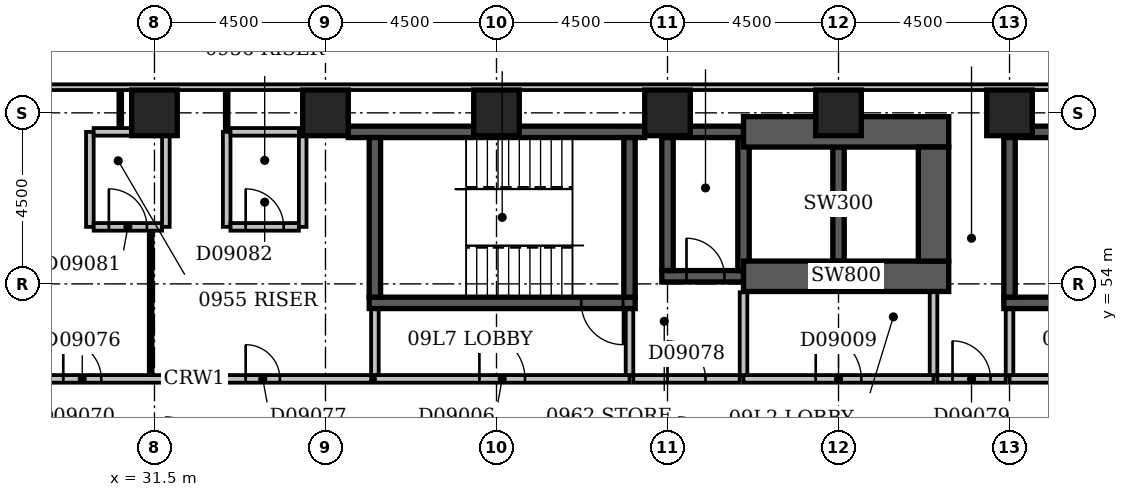
"""IFC4 building model, lengths in metres.
Left out: names, types, materials, properties, quantities, classifications, styles, units other than length and angle.
Written with IfcOpenShell. Run it as: python <this file> out.ifc"""

import sys

from ifc_helpers import new_model, si_unit, direction, frame, frame_2d, origin, origin_2d, place, context, subcontext, project, spatial, rectangle, extrude, element, fill, save


model = new_model("IFC4")
c1 = context("Model", 3, precision=1e-05, world=origin(), true_north=direction((0.0, 1.0)))
c2 = subcontext(c1, "Body", "Model", "MODEL_VIEW")
j1 = project(units=[si_unit("LENGTHUNIT", "METRE"), si_unit("PLANEANGLEUNIT", "RADIAN")], contexts=[c1])
p1 = place(None, origin())
s1 = spatial("IfcSite", under=j1, at=p1, CompositionType="ELEMENT")
p2 = place(p1, origin())
s2 = spatial("IfcBuilding", under=s1, at=p2, CompositionType="ELEMENT")
p3 = place(p2, frame((0.0, 0.0, 43.4)))
s3 = spatial("IfcBuildingStorey", under=s2, at=p3, CompositionType="ELEMENT", Elevation=43.4)
p4 = place(p3, frame((36.6, 58.0, -0.3), z_axis=(0.0, 0.0, 1.0), x_axis=(1.0, 0.0, 0.0)))
e1 = element("IfcWall", 1, at=p4, inside=s3, PredefinedType="SHEAR", context=c2, shape_type="SweptSolid", body=[
    extrude(rectangle(XDim=7.8, YDim=0.3, at=frame_2d((3.9, 0.0))), origin(), (0.0, 0.0, 1.0), 3.6),
])
p5 = place(p3, frame((37.15, 53.5, -0.3), z_axis=(0.0, 0.0, 1.0), x_axis=(1.0, 0.0, 0.0)))
e2 = element("IfcWall", 2, at=p5, inside=s3, PredefinedType="SHEAR", context=c2, shape_type="SweptSolid", body=[
    extrude(rectangle(XDim=7.0, YDim=0.3, at=frame_2d((3.5, 0.0))), origin(), (0.0, 0.0, 1.0), 3.6),
])
p6 = place(p5, frame((5.58, 0.0, 0.3)))
e3 = element("IfcOpeningElement", 3, at=p6, cuts=e2, PredefinedType="OPENING", context=c2, shape_type="SweptSolid", body=[
    extrude(rectangle(XDim=1.1, YDim=2.1, at=frame_2d((0.55, 1.05))), frame((0.0, 0.162, 0.0), z_axis=(0.0, -1.0, 0.0), x_axis=(1.0, 0.0, 0.0)), (0.0, 0.0, 1.0), 0.324),
])
for number, where, z_axis, x_axis in (
    (4, (37.3, 53.65, -0.3), (0.0, 0.0, 1.0), (0.0, 1.0, 0.0)),
    (5, (44.0, 53.65, -0.3), (0.0, 0.0, 1.0), (0.0, 1.0, 0.0)),
):
    element("IfcWall", number, at=place(p3, frame(where, z_axis=z_axis, x_axis=x_axis)), inside=s3, PredefinedType="SHEAR", context=c2, shape_type="SweptSolid", body=[
        extrude(rectangle(XDim=4.2, YDim=0.3, at=frame_2d((2.1, 0.0))), origin(), (0.0, 0.0, 1.0), 3.6),
    ])
p7 = place(p3, frame((44.85, 54.2, -0.3), z_axis=(0.0, 0.0, 1.0), x_axis=(1.0, 0.0, 0.0)))
e6 = element("IfcWall", 6, at=p7, inside=s3, PredefinedType="SHEAR", context=c2, shape_type="SweptSolid", body=[
    extrude(rectangle(XDim=2.15, YDim=0.3, at=frame_2d((1.075, 0.0))), origin(), (0.0, 0.0, 1.0), 3.6),
])
p8 = place(p7, frame((0.65, 0.0, 0.3)))
e7 = element("IfcOpeningElement", 7, at=p8, cuts=e6, PredefinedType="OPENING", context=c2, shape_type="SweptSolid", body=[
    extrude(rectangle(XDim=1.0, YDim=2.1, at=frame_2d((0.5, 1.05))), frame((0.0, 0.162, 0.0), z_axis=(0.0, -1.0, 0.0), x_axis=(1.0, 0.0, 0.0)), (0.0, 0.0, 1.0), 0.324),
])
p9 = place(p3, frame((44.85, 58.0, -0.3), z_axis=(0.0, 0.0, 1.0), x_axis=(1.0, 0.0, 0.0)))
e8 = element("IfcWall", 8, at=p9, inside=s3, PredefinedType="SHEAR", context=c2, shape_type="SweptSolid", body=[
    extrude(rectangle(XDim=2.15, YDim=0.3, at=frame_2d((1.075, 0.0))), origin(), (0.0, 0.0, 1.0), 3.6),
])
p10 = place(p3, frame((45.0, 54.35, -0.3), z_axis=(0.0, 0.0, 1.0), x_axis=(0.0, 1.0, 0.0)))
e9 = element("IfcWall", 9, at=p10, inside=s3, PredefinedType="SHEAR", context=c2, shape_type="SweptSolid", body=[
    extrude(rectangle(XDim=3.5, YDim=0.3, at=frame_2d((1.75, 0.0))), origin(), (0.0, 0.0, 1.0), 3.6),
])
p11 = place(p3, frame((47.0, 54.2, -0.3), z_axis=(0.0, 0.0, 1.0), x_axis=(1.0, 0.0, 0.0)))
e10 = element("IfcWall", 10, at=p11, inside=s3, PredefinedType="SHEAR", context=c2, shape_type="SweptSolid", body=[
    extrude(rectangle(XDim=5.4, YDim=0.8, at=frame_2d((2.7, 0.0))), origin(), (0.0, 0.0, 1.0), 3.6),
])
p12 = place(p3, frame((47.0, 54.35, -0.3), z_axis=(0.0, 0.0, 1.0), x_axis=(0.0, 1.0, 0.0)))
e11 = element("IfcWall", 11, at=p12, inside=s3, PredefinedType="SHEAR", context=c2, shape_type="SweptSolid", body=[
    extrude(rectangle(XDim=3.5, YDim=0.3, at=frame_2d((1.75, 0.0))), origin(), (0.0, 0.0, 1.0), 3.6),
])
p13 = place(p3, frame((47.0, 58.0, -0.3), z_axis=(0.0, 0.0, 1.0), x_axis=(1.0, 0.0, 0.0)))
e12 = element("IfcWall", 12, at=p13, inside=s3, PredefinedType="SHEAR", context=c2, shape_type="SweptSolid", body=[
    extrude(rectangle(XDim=5.4, YDim=0.8, at=frame_2d((2.7, 0.0))), origin(), (0.0, 0.0, 1.0), 3.6),
])
p14 = place(p3, frame((49.5, 54.6, -0.3), z_axis=(0.0, 0.0, 1.0), x_axis=(0.0, 1.0, 0.0)))
e13 = element("IfcWall", 13, at=p14, inside=s3, PredefinedType="SHEAR", context=c2, shape_type="SweptSolid", body=[
    extrude(rectangle(XDim=3.0, YDim=0.3, at=frame_2d((1.5, 0.0))), origin(), (0.0, 0.0, 1.0), 3.6),
])
p15 = place(p3, frame((52.0, 54.6, -0.3), z_axis=(0.0, 0.0, 1.0), x_axis=(0.0, 1.0, 0.0)))
e14 = element("IfcWall", 14, at=p15, inside=s3, PredefinedType="SHEAR", context=c2, shape_type="SweptSolid", body=[
    extrude(rectangle(XDim=3.0, YDim=0.8, at=frame_2d((1.5, 0.0))), origin(), (0.0, 0.0, 1.0), 3.6),
])
p16 = place(p3, frame((53.85, 53.5, -0.3), z_axis=(0.0, 0.0, 1.0), x_axis=(1.0, 0.0, 0.0)))
e15 = element("IfcWall", 15, at=p16, inside=s3, PredefinedType="SHEAR", context=c2, shape_type="SweptSolid", body=[
    extrude(rectangle(XDim=7.0, YDim=0.3, at=frame_2d((3.5, 0.0))), origin(), (0.0, 0.0, 1.0), 3.6),
])
p17 = place(p16, frame((5.58, 0.0, 0.3)))
e16 = element("IfcOpeningElement", 16, at=p17, cuts=e15, PredefinedType="OPENING", context=c2, shape_type="SweptSolid", body=[
    extrude(rectangle(XDim=1.1, YDim=2.1, at=frame_2d((0.55, 1.05))), frame((0.0, 0.162, 0.0), z_axis=(0.0, -1.0, 0.0), x_axis=(1.0, 0.0, 0.0)), (0.0, 0.0, 1.0), 0.324),
])
p18 = place(p3, frame((53.85, 58.0, -0.3), z_axis=(0.0, 0.0, 1.0), x_axis=(1.0, 0.0, 0.0)))
e17 = element("IfcWall", 17, at=p18, inside=s3, PredefinedType="SHEAR", context=c2, shape_type="SweptSolid", body=[
    extrude(rectangle(XDim=7.0, YDim=0.3, at=frame_2d((3.5, 0.0))), origin(), (0.0, 0.0, 1.0), 3.6),
])
p19 = place(p3, frame((54.0, 53.65, -0.3), z_axis=(0.0, 0.0, 1.0), x_axis=(0.0, 1.0, 0.0)))
e18 = element("IfcWall", 18, at=p19, inside=s3, PredefinedType="SHEAR", context=c2, shape_type="SweptSolid", body=[
    extrude(rectangle(XDim=4.2, YDim=0.3, at=frame_2d((2.1, 0.0))), origin(), (0.0, 0.0, 1.0), 3.6),
])
for number, where, z_axis, x_axis in (
    (19, (31.5, 58.5, -0.3), (0.0, 0.0, 1.0), (1.0, 0.0, 0.0)),
    (20, (36.0, 58.5, -0.3), (0.0, 0.0, 1.0), (1.0, 0.0, 0.0)),
    (21, (40.5, 58.5, -0.3), (0.0, 0.0, 1.0), (1.0, 0.0, 0.0)),
    (22, (45.0, 58.5, -0.3), (0.0, 0.0, 1.0), (1.0, 0.0, 0.0)),
    (23, (49.5, 58.5, -0.3), (0.0, 0.0, 1.0), (1.0, 0.0, 0.0)),
    (24, (54.0, 58.5, -0.3), (0.0, 0.0, 1.0), (1.0, 0.0, 0.0)),
):
    element("IfcColumn", number, at=place(p3, frame(where, z_axis=z_axis, x_axis=x_axis)), inside=s3, PredefinedType="COLUMN", context=c2, shape_type="SweptSolid", body=[
        extrude(rectangle(XDim=1.2, YDim=1.2, at=origin_2d()), origin(), (0.0, 0.0, 1.0), 3.6),
    ])
p20 = place(p3, frame((68.1, 59.175, 0.0), z_axis=(0.0, 0.0, 1.0), x_axis=(-1.0, 0.0, 0.0)))
e25 = element("IfcWall", 25, at=p20, inside=s3, PredefinedType="STANDARD", context=c2, shape_type="SweptSolid", body=[
    extrude(rectangle(XDim=68.85, YDim=0.15, at=frame_2d((34.425, 0.0))), origin(), (0.0, 0.0, 1.0), 2.7),
])
p21 = place(p20, frame((1.523, 0.0, 0.6)))
e26 = element("IfcOpeningElement", 26, at=p21, cuts=e25, PredefinedType="OPENING", context=c2, shape_type="SweptSolid", body=[
    extrude(rectangle(XDim=1.2, YDim=1.8, at=frame_2d((0.6, 0.9))), frame((0.0, 0.087, 0.0), z_axis=(0.0, -1.0, 0.0), x_axis=(1.0, 0.0, 0.0)), (0.0, 0.0, 1.0), 0.174),
])
p22 = place(p20, frame((6.15, 0.0, 0.6)))
e27 = element("IfcOpeningElement", 27, at=p22, cuts=e25, PredefinedType="OPENING", context=c2, shape_type="SweptSolid", body=[
    extrude(rectangle(XDim=2.4, YDim=1.8, at=frame_2d((1.2, 0.9))), frame((0.0, 0.087, 0.0), z_axis=(0.0, -1.0, 0.0), x_axis=(1.0, 0.0, 0.0)), (0.0, 0.0, 1.0), 0.174),
])
p23 = place(p3, frame((47.0, 51.5, 0.0), z_axis=(0.0, 0.0, 1.0), x_axis=(1.0, 0.0, 0.0)))
e28 = element("IfcWall", 28, at=p23, inside=s3, PredefinedType="PARTITIONING", context=c2, shape_type="SweptSolid", body=[
    extrude(rectangle(XDim=5.0, YDim=0.2, at=frame_2d((2.5, 0.0))), origin(), (0.0, 0.0, 1.0), 3.3),
])
p24 = place(p23, frame((1.9, 0.0, 0.0)))
e29 = element("IfcOpeningElement", 29, at=p24, cuts=e28, PredefinedType="OPENING", context=c2, shape_type="SweptSolid", body=[
    extrude(rectangle(XDim=1.2, YDim=2.1, at=frame_2d((0.6, 1.05))), frame((0.0, 0.112, 0.0), z_axis=(0.0, -1.0, 0.0), x_axis=(1.0, 0.0, 0.0)), (0.0, 0.0, 1.0), 0.224),
])
for number, where, z_axis, x_axis in (
    (30, (52.0, 51.6, 0.0), (0.0, 0.0, 1.0), (0.0, 1.0, 0.0)),
    (31, (47.0, 51.6, 0.0), (0.0, 0.0, 1.0), (0.0, 1.0, 0.0)),
):
    element("IfcWall", number, at=place(p3, frame(where, z_axis=z_axis, x_axis=x_axis)), inside=s3, PredefinedType="PARTITIONING", context=c2, shape_type="SweptSolid", body=[
        extrude(rectangle(XDim=2.18, YDim=0.2, at=frame_2d((1.09, 0.0))), origin(), (0.0, 0.0, 1.0), 3.3),
    ])
p25 = place(p3, frame((37.3, 51.5, 0.0), z_axis=(0.0, 0.0, 1.0), x_axis=(1.0, 0.0, 0.0)))
e32 = element("IfcWall", 32, at=p25, inside=s3, PredefinedType="PARTITIONING", context=c2, shape_type="SweptSolid", body=[
    extrude(rectangle(XDim=6.7, YDim=0.2, at=frame_2d((3.35, 0.0))), origin(), (0.0, 0.0, 1.0), 3.3),
])
p26 = place(p25, frame((2.75, 0.0, 0.0)))
e33 = element("IfcOpeningElement", 33, at=p26, cuts=e32, PredefinedType="OPENING", context=c2, shape_type="SweptSolid", body=[
    extrude(rectangle(XDim=1.2, YDim=2.1, at=frame_2d((0.6, 1.05))), frame((0.0, 0.112, 0.0), z_axis=(0.0, -1.0, 0.0), x_axis=(1.0, 0.0, 0.0)), (0.0, 0.0, 1.0), 0.224),
])
for number, where, z_axis, x_axis in (
    (34, (44.0, 51.6, 0.0), (0.0, 0.0, 1.0), (0.0, 1.0, 0.0)),
    (35, (37.3, 51.6, 0.0), (0.0, 0.0, 1.0), (0.0, 1.0, 0.0)),
):
    element("IfcWall", number, at=place(p3, frame(where, z_axis=z_axis, x_axis=x_axis)), inside=s3, PredefinedType="PARTITIONING", context=c2, shape_type="SweptSolid", body=[
        extrude(rectangle(XDim=1.73, YDim=0.2, at=frame_2d((0.865, 0.0))), origin(), (0.0, 0.0, 1.0), 3.3),
    ])
p27 = place(p3, frame((54.0, 51.5, 0.0), z_axis=(0.0, 0.0, 1.0), x_axis=(1.0, 0.0, 0.0)))
e36 = element("IfcWall", 36, at=p27, inside=s3, PredefinedType="PARTITIONING", context=c2, shape_type="SweptSolid", body=[
    extrude(rectangle(XDim=6.7, YDim=0.2, at=frame_2d((3.35, 0.0))), origin(), (0.0, 0.0, 1.0), 3.3),
])
p28 = place(p27, frame((2.75, 0.0, 0.0)))
e37 = element("IfcOpeningElement", 37, at=p28, cuts=e36, PredefinedType="OPENING", context=c2, shape_type="SweptSolid", body=[
    extrude(rectangle(XDim=1.2, YDim=2.1, at=frame_2d((0.6, 1.05))), frame((0.0, 0.112, 0.0), z_axis=(0.0, -1.0, 0.0), x_axis=(1.0, 0.0, 0.0)), (0.0, 0.0, 1.0), 0.224),
])
p29 = place(p3, frame((54.0, 51.6, 0.0), z_axis=(0.0, 0.0, 1.0), x_axis=(0.0, 1.0, 0.0)))
e38 = element("IfcWall", 38, at=p29, inside=s3, PredefinedType="PARTITIONING", context=c2, shape_type="SweptSolid", body=[
    extrude(rectangle(XDim=1.73, YDim=0.2, at=frame_2d((0.865, 0.0))), origin(), (0.0, 0.0, 1.0), 2.6),
])
p30 = place(p3, frame((27.9, 51.5, 0.0), z_axis=(0.0, 0.0, 1.0), x_axis=(1.0, 0.0, 0.0)))
e39 = element("IfcWall", 39, at=p30, inside=s3, PredefinedType="PARTITIONING", context=c2, shape_type="SweptSolid", body=[
    extrude(rectangle(XDim=9.3, YDim=0.2, at=frame_2d((4.65, 0.0))), origin(), (0.0, 0.0, 1.0), 3.3),
])
p31 = place(p30, frame((1.2, 0.0, 0.0)))
e40 = element("IfcOpeningElement", 40, at=p31, cuts=e39, PredefinedType="OPENING", context=c2, shape_type="SweptSolid", body=[
    extrude(rectangle(XDim=1.0, YDim=2.1, at=frame_2d((0.5, 1.05))), frame((0.0, 0.112, 0.0), z_axis=(0.0, -1.0, 0.0), x_axis=(1.0, 0.0, 0.0)), (0.0, 0.0, 1.0), 0.224),
])
p32 = place(p30, frame((6.0, 0.0, 0.0)))
e41 = element("IfcOpeningElement", 41, at=p32, cuts=e39, PredefinedType="OPENING", context=c2, shape_type="SweptSolid", body=[
    extrude(rectangle(XDim=0.9, YDim=2.1, at=frame_2d((0.45, 1.05))), frame((0.0, 0.112, 0.0), z_axis=(0.0, -1.0, 0.0), x_axis=(1.0, 0.0, 0.0)), (0.0, 0.0, 1.0), 0.224),
])
p33 = place(p3, frame((44.1, 51.5, 0.0), z_axis=(0.0, 0.0, 1.0), x_axis=(1.0, 0.0, 0.0)))
e42 = element("IfcWall", 42, at=p33, inside=s3, PredefinedType="PARTITIONING", context=c2, shape_type="SweptSolid", body=[
    extrude(rectangle(XDim=2.8, YDim=0.2, at=frame_2d((1.4, 0.0))), origin(), (0.0, 0.0, 1.0), 3.3),
])
p34 = place(p33, frame((0.9, 0.0, 0.0)))
e43 = element("IfcOpeningElement", 43, at=p34, cuts=e42, PredefinedType="OPENING", context=c2, shape_type="SweptSolid", body=[
    extrude(rectangle(XDim=1.0, YDim=2.1, at=frame_2d((0.5, 1.05))), frame((0.0, 0.112, 0.0), z_axis=(0.0, -1.0, 0.0), x_axis=(1.0, 0.0, 0.0)), (0.0, 0.0, 1.0), 0.224),
])
p35 = place(p3, frame((52.1, 51.5, 0.0), z_axis=(0.0, 0.0, 1.0), x_axis=(1.0, 0.0, 0.0)))
e44 = element("IfcWall", 44, at=p35, inside=s3, PredefinedType="PARTITIONING", context=c2, shape_type="SweptSolid", body=[
    extrude(rectangle(XDim=1.8, YDim=0.2, at=frame_2d((0.9, 0.0))), origin(), (0.0, 0.0, 1.0), 3.3),
])
p36 = place(p35, frame((0.4, 0.0, 0.0)))
e45 = element("IfcOpeningElement", 45, at=p36, cuts=e44, PredefinedType="OPENING", context=c2, shape_type="SweptSolid", body=[
    extrude(rectangle(XDim=1.0, YDim=2.1, at=frame_2d((0.5, 1.05))), frame((0.0, 0.112, 0.0), z_axis=(0.0, -1.0, 0.0), x_axis=(1.0, 0.0, 0.0)), (0.0, 0.0, 1.0), 0.224),
])
p37 = place(p3, frame((31.4, 51.6, 0.0), z_axis=(0.0, 0.0, 1.0), x_axis=(0.0, 1.0, 0.0)))
e46 = element("IfcWall", 46, at=p37, inside=s3, PredefinedType="PARTITIONING", context=c2, shape_type="SweptSolid", body=[
    extrude(rectangle(XDim=3.8, YDim=0.1, at=frame_2d((1.9, 0.0))), origin(), (0.0, 0.0, 1.0), 3.3),
])
p38 = place(p3, frame((29.8, 55.5, 0.0), z_axis=(0.0, 0.0, 1.0), x_axis=(0.0, 1.0, 0.0)))
e47 = element("IfcWall", 47, at=p38, inside=s3, PredefinedType="PARTITIONING", context=c2, shape_type="SweptSolid", body=[
    extrude(rectangle(XDim=2.5, YDim=0.2, at=frame_2d((1.25, 0.0))), origin(), (0.0, 0.0, 1.0), 3.3),
])
p39 = place(p3, frame((29.9, 55.5, 0.0), z_axis=(0.0, 0.0, 1.0), x_axis=(1.0, 0.0, 0.0)))
e48 = element("IfcWall", 48, at=p39, inside=s3, PredefinedType="PARTITIONING", context=c2, shape_type="SweptSolid", body=[
    extrude(rectangle(XDim=1.8, YDim=0.2, at=frame_2d((0.9, 0.0))), origin(), (0.0, 0.0, 1.0), 3.3),
])
p40 = place(p39, frame((0.4, 0.0, 0.0)))
e49 = element("IfcOpeningElement", 49, at=p40, cuts=e48, PredefinedType="OPENING", context=c2, shape_type="SweptSolid", body=[
    extrude(rectangle(XDim=1.0, YDim=2.1, at=frame_2d((0.5, 1.05))), frame((0.0, 0.112, 0.0), z_axis=(0.0, -1.0, 0.0), x_axis=(1.0, 0.0, 0.0)), (0.0, 0.0, 1.0), 0.224),
])
for number, where, z_axis, x_axis in (
    (50, (31.8, 55.5, 0.0), (0.0, 0.0, 1.0), (0.0, 1.0, 0.0)),
    (51, (33.4, 55.5, 0.0), (0.0, 0.0, 1.0), (0.0, 1.0, 0.0)),
):
    element("IfcWall", number, at=place(p3, frame(where, z_axis=z_axis, x_axis=x_axis)), inside=s3, PredefinedType="PARTITIONING", context=c2, shape_type="SweptSolid", body=[
        extrude(rectangle(XDim=2.5, YDim=0.2, at=frame_2d((1.25, 0.0))), origin(), (0.0, 0.0, 1.0), 3.3),
    ])
p41 = place(p3, frame((33.5, 55.5, 0.0), z_axis=(0.0, 0.0, 1.0), x_axis=(1.0, 0.0, 0.0)))
e52 = element("IfcWall", 52, at=p41, inside=s3, PredefinedType="PARTITIONING", context=c2, shape_type="SweptSolid", body=[
    extrude(rectangle(XDim=1.8, YDim=0.2, at=frame_2d((0.9, 0.0))), origin(), (0.0, 0.0, 1.0), 3.3),
])
p42 = place(p41, frame((0.4, 0.0, 0.0)))
e53 = element("IfcOpeningElement", 53, at=p42, cuts=e52, PredefinedType="OPENING", context=c2, shape_type="SweptSolid", body=[
    extrude(rectangle(XDim=1.0, YDim=2.1, at=frame_2d((0.5, 1.05))), frame((0.0, 0.112, 0.0), z_axis=(0.0, -1.0, 0.0), x_axis=(1.0, 0.0, 0.0)), (0.0, 0.0, 1.0), 0.224),
])
p43 = place(p3, frame((35.4, 55.5, 0.0), z_axis=(0.0, 0.0, 1.0), x_axis=(0.0, 1.0, 0.0)))
e54 = element("IfcWall", 54, at=p43, inside=s3, PredefinedType="PARTITIONING", context=c2, shape_type="SweptSolid", body=[
    extrude(rectangle(XDim=2.5, YDim=0.2, at=frame_2d((1.25, 0.0))), origin(), (0.0, 0.0, 1.0), 2.4),
])
p44 = place(p3, frame((29.9, 58.0, 0.0), z_axis=(0.0, 0.0, 1.0), x_axis=(1.0, 0.0, 0.0)))
e55 = element("IfcWall", 55, at=p44, inside=s3, PredefinedType="PARTITIONING", context=c2, shape_type="SweptSolid", body=[
    extrude(rectangle(XDim=1.8, YDim=0.2, at=frame_2d((0.9, 0.0))), origin(), (0.0, 0.0, 1.0), 3.3),
])
p45 = place(p3, frame((33.4, 58.0, 0.0), z_axis=(0.0, 0.0, 1.0), x_axis=(0.0, 1.0, 0.0)))
e56 = element("IfcWall", 56, at=p45, inside=s3, PredefinedType="PARTITIONING", context=c2, shape_type="SweptSolid", body=[
    extrude(rectangle(XDim=1.1, YDim=0.1, at=frame_2d((0.55, 0.0))), origin(), (0.0, 0.0, 1.0), 3.3),
])
p46 = place(p3, frame((33.5, 58.0, 0.0), z_axis=(0.0, 0.0, 1.0), x_axis=(1.0, 0.0, 0.0)))
e57 = element("IfcWall", 57, at=p46, inside=s3, PredefinedType="PARTITIONING", context=c2, shape_type="SweptSolid", body=[
    extrude(rectangle(XDim=1.8, YDim=0.2, at=frame_2d((0.9, 0.0))), origin(), (0.0, 0.0, 1.0), 3.3),
])
p47 = place(p3, frame((30.6, 58.1, 0.0), z_axis=(0.0, 0.0, 1.0), x_axis=(0.0, 1.0, 0.0)))
e58 = element("IfcWall", 58, at=p47, inside=s3, PredefinedType="PARTITIONING", context=c2, shape_type="SweptSolid", body=[
    extrude(rectangle(XDim=1.0, YDim=0.1, at=frame_2d((0.5, 0.0))), origin(), (0.0, 0.0, 1.0), 3.3),
])
p48 = place(p26, origin())
e59 = element("IfcDoor", 59, at=p48, inside=s3, OperationType="SINGLE_SWING_LEFT", PredefinedType="DOOR", context=c2, shape_type="SweptSolid", body=[
    extrude(rectangle(XDim=1.2, YDim=2.1, at=frame_2d((0.6, 1.05))), frame((0.0, 0.025, 0.0), z_axis=(0.0, -1.0, 0.0), x_axis=(1.0, 0.0, 0.0)), (0.0, 0.0, 1.0), 0.05),
])
fill(e33, e59)
p49 = place(p24, origin())
e60 = element("IfcDoor", 60, at=p49, inside=s3, OperationType="SINGLE_SWING_LEFT", PredefinedType="DOOR", context=c2, shape_type="SweptSolid", body=[
    extrude(rectangle(XDim=1.2, YDim=2.1, at=frame_2d((0.6, 1.05))), frame((0.0, 0.025, 0.0), z_axis=(0.0, -1.0, 0.0), x_axis=(1.0, 0.0, 0.0)), (0.0, 0.0, 1.0), 0.05),
])
fill(e29, e60)
p50 = place(p8, origin())
e61 = element("IfcDoor", 61, at=p50, inside=s3, OperationType="SINGLE_SWING_LEFT", PredefinedType="DOOR", context=c2, shape_type="SweptSolid", body=[
    extrude(rectangle(XDim=1.0, YDim=2.1, at=frame_2d((0.5, 1.05))), frame((0.0, 0.025, 0.0), z_axis=(0.0, -1.0, 0.0), x_axis=(1.0, 0.0, 0.0)), (0.0, 0.0, 1.0), 0.05),
])
fill(e7, e61)
p51 = place(p6, origin())
e62 = element("IfcDoor", 62, at=p51, inside=s3, OperationType="SINGLE_SWING_RIGHT", PredefinedType="DOOR", context=c2, shape_type="SweptSolid", body=[
    extrude(rectangle(XDim=1.1, YDim=2.1, at=frame_2d((0.55, 1.05))), frame((0.0, 0.025, 0.0), z_axis=(0.0, -1.0, 0.0), x_axis=(1.0, 0.0, 0.0)), (0.0, 0.0, 1.0), 0.05),
])
fill(e3, e62)
p52 = place(p31, origin())
e63 = element("IfcDoor", 63, at=p52, inside=s3, OperationType="SINGLE_SWING_LEFT", PredefinedType="DOOR", context=c2, shape_type="SweptSolid", body=[
    extrude(rectangle(XDim=1.0, YDim=2.1, at=frame_2d((0.5, 1.05))), frame((0.0, 0.025, 0.0), z_axis=(0.0, -1.0, 0.0), x_axis=(1.0, 0.0, 0.0)), (0.0, 0.0, 1.0), 0.05),
])
fill(e40, e63)
p53 = place(p32, origin())
e64 = element("IfcDoor", 64, at=p53, inside=s3, OperationType="SINGLE_SWING_LEFT", PredefinedType="DOOR", context=c2, shape_type="SweptSolid", body=[
    extrude(rectangle(XDim=0.9, YDim=2.1, at=frame_2d((0.45, 1.05))), frame((0.0, 0.025, 0.0), z_axis=(0.0, -1.0, 0.0), x_axis=(1.0, 0.0, 0.0)), (0.0, 0.0, 1.0), 0.05),
])
fill(e41, e64)
p54 = place(p34, origin())
e65 = element("IfcDoor", 65, at=p54, inside=s3, OperationType="SINGLE_SWING_LEFT", PredefinedType="DOOR", context=c2, shape_type="SweptSolid", body=[
    extrude(rectangle(XDim=1.0, YDim=2.1, at=frame_2d((0.5, 1.05))), frame((0.0, 0.025, 0.0), z_axis=(0.0, -1.0, 0.0), x_axis=(1.0, 0.0, 0.0)), (0.0, 0.0, 1.0), 0.05),
])
fill(e43, e65)
p55 = place(p36, origin())
e66 = element("IfcDoor", 66, at=p55, inside=s3, OperationType="SINGLE_SWING_LEFT", PredefinedType="DOOR", context=c2, shape_type="SweptSolid", body=[
    extrude(rectangle(XDim=1.0, YDim=2.1, at=frame_2d((0.5, 1.05))), frame((0.0, 0.025, 0.0), z_axis=(0.0, -1.0, 0.0), x_axis=(1.0, 0.0, 0.0)), (0.0, 0.0, 1.0), 0.05),
])
fill(e45, e66)
p56 = place(p40, origin())
e67 = element("IfcDoor", 67, at=p56, inside=s3, OperationType="SINGLE_SWING_LEFT", PredefinedType="DOOR", context=c2, shape_type="SweptSolid", body=[
    extrude(rectangle(XDim=1.0, YDim=2.1, at=frame_2d((0.5, 1.05))), frame((0.0, 0.025, 0.0), z_axis=(0.0, -1.0, 0.0), x_axis=(1.0, 0.0, 0.0)), (0.0, 0.0, 1.0), 0.05),
])
fill(e49, e67)
p57 = place(p42, origin())
e68 = element("IfcDoor", 68, at=p57, inside=s3, OperationType="SINGLE_SWING_LEFT", PredefinedType="DOOR", context=c2, shape_type="SweptSolid", body=[
    extrude(rectangle(XDim=1.0, YDim=2.1, at=frame_2d((0.5, 1.05))), frame((0.0, 0.025, 0.0), z_axis=(0.0, -1.0, 0.0), x_axis=(1.0, 0.0, 0.0)), (0.0, 0.0, 1.0), 0.05),
])
fill(e53, e68)
save(model, sys.argv[1])
